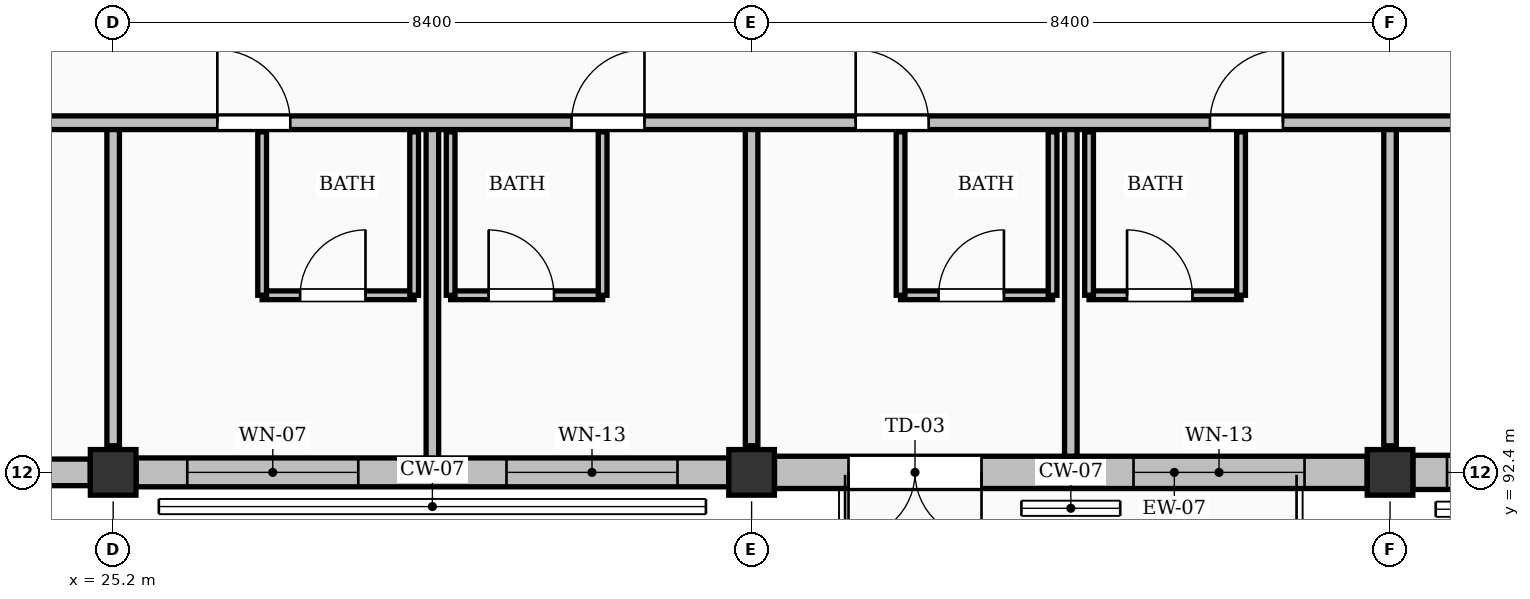
"""IFC4 building model, lengths in metres.
Left out: names, types, materials, properties, quantities, classifications, styles, units other than length and angle.
Written with IfcOpenShell. Run it as: python <this file> out.ifc"""

import sys

from ifc_helpers import new_model, si_unit, direction, frame, frame_2d, origin, origin_2d, place, context, subcontext, project, spatial, rectangle, extrude, element, fill, save


model = new_model("IFC4")
c1 = context("Model", 3, precision=1e-05, world=origin(), true_north=direction((0.0, 1.0)))
c2 = subcontext(c1, "Body", "Model", "MODEL_VIEW")
j1 = project(units=[si_unit("LENGTHUNIT", "METRE"), si_unit("PLANEANGLEUNIT", "RADIAN")], contexts=[c1])
p1 = place(None, origin())
s1 = spatial("IfcSite", under=j1, at=p1, CompositionType="ELEMENT")
p2 = place(p1, origin())
s2 = spatial("IfcBuilding", under=s1, at=p2, CompositionType="ELEMENT")
p3 = place(p2, frame((0.0, 0.0, 31.92)))
s3 = spatial("IfcBuildingStorey", under=s2, at=p3, CompositionType="ELEMENT", Elevation=31.92)
for number, where, z_axis, x_axis in (
    (1, (25.2, 92.4, 0.0), (0.0, 0.0, 1.0), (1.0, 0.0, 0.0)),
    (2, (33.6, 92.4, 0.0), (0.0, 0.0, 1.0), (1.0, 0.0, 0.0)),
    (3, (42.0, 92.4, 0.0), (0.0, 0.0, 1.0), (1.0, 0.0, 0.0)),
):
    element("IfcColumn", number, at=place(p3, frame(where, z_axis=z_axis, x_axis=x_axis)), inside=s3, PredefinedType="COLUMN", context=c2, shape_type="SweptSolid", body=[
        extrude(rectangle(XDim=0.6, YDim=0.6, at=origin_2d()), origin(), (0.0, 0.0, 1.0), 3.36),
    ])
p4 = place(p3, frame((17.101, 92.4, 0.0), z_axis=(0.0, 0.0, 1.0), x_axis=(1.0, 0.0, 0.0)))
e4 = element("IfcWall", 4, at=p4, inside=s3, PredefinedType="SOLIDWALL", context=c2, shape_type="SweptSolid", body=[
    extrude(rectangle(XDim=7.798, YDim=0.35, at=frame_2d((3.899, 0.0))), origin(), (0.0, 0.0, 1.0), 2.474),
])
p5 = place(p4, frame((1.024, 0.0, 0.0)))
e5 = element("IfcOpeningElement", 5, at=p5, cuts=e4, PredefinedType="OPENING", context=c2, shape_type="SweptSolid", body=[
    extrude(rectangle(XDim=1.65, YDim=2.08, at=frame_2d((0.825, 1.04))), frame((0.0, 0.185, 0.0), z_axis=(0.0, -1.0, 0.0), x_axis=(1.0, 0.0, 0.0)), (0.0, 0.0, 1.0), 0.37),
])
p6 = place(p4, frame((4.674, 0.0, 0.25)))
e6 = element("IfcOpeningElement", 6, at=p6, cuts=e4, PredefinedType="OPENING", context=c2, shape_type="SweptSolid", body=[
    extrude(rectangle(XDim=2.35, YDim=1.85, at=frame_2d((1.175, 0.925))), frame((0.0, 0.185, 0.0), z_axis=(0.0, -1.0, 0.0), x_axis=(1.0, 0.0, 0.0)), (0.0, 0.0, 1.0), 0.37),
])
p7 = place(p3, frame((25.501, 92.4, 0.0), z_axis=(0.0, 0.0, 1.0), x_axis=(1.0, 0.0, 0.0)))
e7 = element("IfcWall", 7, at=p7, inside=s3, PredefinedType="SOLIDWALL", context=c2, shape_type="SweptSolid", body=[
    extrude(rectangle(XDim=7.798, YDim=0.38, at=frame_2d((3.899, 0.0))), origin(), (0.0, 0.0, 1.0), 2.474),
])
p8 = place(p7, frame((0.674, 0.0, 0.25)))
e8 = element("IfcOpeningElement", 8, at=p8, cuts=e7, PredefinedType="OPENING", context=c2, shape_type="SweptSolid", body=[
    extrude(rectangle(XDim=2.25, YDim=1.95, at=frame_2d((1.125, 0.975))), frame((0.0, 0.2, 0.0), z_axis=(0.0, -1.0, 0.0), x_axis=(1.0, 0.0, 0.0)), (0.0, 0.0, 1.0), 0.4),
])
p9 = place(p7, frame((4.874, 0.0, 0.25)))
e9 = element("IfcOpeningElement", 9, at=p9, cuts=e7, PredefinedType="OPENING", context=c2, shape_type="SweptSolid", body=[
    extrude(rectangle(XDim=2.25, YDim=2.05, at=frame_2d((1.125, 1.025))), frame((0.0, 0.2, 0.0), z_axis=(0.0, -1.0, 0.0), x_axis=(1.0, 0.0, 0.0)), (0.0, 0.0, 1.0), 0.4),
])
p10 = place(p3, frame((33.901, 92.4, 0.0), z_axis=(0.0, 0.0, 1.0), x_axis=(1.0, 0.0, 0.0)))
e10 = element("IfcWall", 10, at=p10, inside=s3, PredefinedType="SOLIDWALL", context=c2, shape_type="SweptSolid", body=[
    extrude(rectangle(XDim=7.798, YDim=0.425, at=frame_2d((3.899, 0.0))), origin(), (0.0, 0.0, 1.0), 2.474),
])
p11 = place(p10, frame((0.974, 0.0, 0.0)))
e11 = element("IfcOpeningElement", 11, at=p11, cuts=e10, PredefinedType="OPENING", context=c2, shape_type="SweptSolid", body=[
    extrude(rectangle(XDim=1.75, YDim=2.08, at=frame_2d((0.875, 1.04))), frame((0.0, 0.223, 0.0), z_axis=(0.0, -1.0, 0.0), x_axis=(1.0, 0.0, 0.0)), (0.0, 0.0, 1.0), 0.445),
])
p12 = place(p10, frame((4.724, 0.0, 0.25)))
e12 = element("IfcOpeningElement", 12, at=p12, cuts=e10, PredefinedType="OPENING", context=c2, shape_type="SweptSolid", body=[
    extrude(rectangle(XDim=2.25, YDim=2.05, at=frame_2d((1.125, 1.025))), frame((0.0, 0.223, 0.0), z_axis=(0.0, -1.0, 0.0), x_axis=(1.0, 0.0, 0.0)), (0.0, 0.0, 1.0), 0.445),
])
p13 = place(p3, frame((42.301, 92.4, 0.0), z_axis=(0.0, 0.0, 1.0), x_axis=(1.0, 0.0, 0.0)))
e13 = element("IfcWall", 13, at=p13, inside=s3, PredefinedType="SOLIDWALL", context=c2, shape_type="SweptSolid", body=[
    extrude(rectangle(XDim=7.798, YDim=0.45, at=frame_2d((3.899, 0.0))), origin(), (0.0, 0.0, 1.0), 2.474),
])
p14 = place(p13, frame((0.449, 0.0, 0.25)))
e14 = element("IfcOpeningElement", 14, at=p14, cuts=e13, PredefinedType="OPENING", context=c2, shape_type="SweptSolid", body=[
    extrude(rectangle(XDim=2.7, YDim=1.75, at=frame_2d((1.35, 0.875))), frame((0.0, 0.235, 0.0), z_axis=(0.0, -1.0, 0.0), x_axis=(1.0, 0.0, 0.0)), (0.0, 0.0, 1.0), 0.47),
])
p15 = place(p13, frame((4.689, 0.0, 0.25)))
e15 = element("IfcOpeningElement", 15, at=p15, cuts=e13, PredefinedType="OPENING", context=c2, shape_type="SweptSolid", body=[
    extrude(rectangle(XDim=2.62, YDim=1.9, at=frame_2d((1.31, 0.95))), frame((0.0, 0.235, 0.0), z_axis=(0.0, -1.0, 0.0), x_axis=(1.0, 0.0, 0.0)), (0.0, 0.0, 1.0), 0.47),
])
p16 = place(p3, frame((27.16, 94.73, 0.0), z_axis=(0.0, 0.0, 1.0), x_axis=(1.0, 0.0, 0.0)))
e16 = element("IfcWall", 16, at=p16, inside=s3, PredefinedType="PARTITIONING", context=c2, shape_type="SweptSolid", body=[
    extrude(rectangle(XDim=2.0, YDim=0.115, at=frame_2d((1.0, 0.0))), origin(), (0.0, 0.0, 1.0), 3.1),
])
p17 = place(p16, frame((0.5, 0.0, 0.0)))
e17 = element("IfcOpeningElement", 17, at=p17, cuts=e16, PredefinedType="OPENING", context=c2, shape_type="SweptSolid", body=[
    extrude(rectangle(XDim=0.86, YDim=2.05, at=frame_2d((0.43, 1.025))), frame((0.0, 0.067, 0.0), z_axis=(0.0, -1.0, 0.0), x_axis=(1.0, 0.0, 0.0)), (0.0, 0.0, 1.0), 0.135),
])
p18 = place(p3, frame((27.16, 94.73, 0.0), z_axis=(0.0, 0.0, 1.0), x_axis=(0.0, 1.0, 0.0)))
e18 = element("IfcWall", 18, at=p18, inside=s3, PredefinedType="PARTITIONING", context=c2, shape_type="SweptSolid", body=[
    extrude(rectangle(XDim=2.15, YDim=0.115, at=frame_2d((1.075, 0.0))), origin(), (0.0, 0.0, 1.0), 2.622),
])
p19 = place(p3, frame((29.16, 94.73, 0.0), z_axis=(0.0, 0.0, 1.0), x_axis=(0.0, 1.0, 0.0)))
e19 = element("IfcWall", 19, at=p19, inside=s3, PredefinedType="PARTITIONING", context=c2, shape_type="SweptSolid", body=[
    extrude(rectangle(XDim=2.15, YDim=0.115, at=frame_2d((1.075, 0.0))), origin(), (0.0, 0.0, 1.0), 3.1),
])
p20 = place(p3, frame((29.64, 94.73, 0.0), z_axis=(0.0, 0.0, 1.0), x_axis=(1.0, 0.0, 0.0)))
e20 = element("IfcWall", 20, at=p20, inside=s3, PredefinedType="PARTITIONING", context=c2, shape_type="SweptSolid", body=[
    extrude(rectangle(XDim=2.0, YDim=0.115, at=frame_2d((1.0, 0.0))), origin(), (0.0, 0.0, 1.0), 3.1),
])
p21 = place(p20, frame((0.5, 0.0, 0.0)))
e21 = element("IfcOpeningElement", 21, at=p21, cuts=e20, PredefinedType="OPENING", context=c2, shape_type="SweptSolid", body=[
    extrude(rectangle(XDim=0.86, YDim=2.05, at=frame_2d((0.43, 1.025))), frame((0.0, 0.067, 0.0), z_axis=(0.0, -1.0, 0.0), x_axis=(1.0, 0.0, 0.0)), (0.0, 0.0, 1.0), 0.135),
])
p22 = place(p3, frame((29.64, 94.73, 0.0), z_axis=(0.0, 0.0, 1.0), x_axis=(0.0, 1.0, 0.0)))
e22 = element("IfcWall", 22, at=p22, inside=s3, PredefinedType="PARTITIONING", context=c2, shape_type="SweptSolid", body=[
    extrude(rectangle(XDim=2.15, YDim=0.115, at=frame_2d((1.075, 0.0))), origin(), (0.0, 0.0, 1.0), 3.1),
])
p23 = place(p3, frame((31.64, 94.73, 0.0), z_axis=(0.0, 0.0, 1.0), x_axis=(0.0, 1.0, 0.0)))
e23 = element("IfcWall", 23, at=p23, inside=s3, PredefinedType="PARTITIONING", context=c2, shape_type="SweptSolid", body=[
    extrude(rectangle(XDim=2.15, YDim=0.115, at=frame_2d((1.075, 0.0))), origin(), (0.0, 0.0, 1.0), 2.622),
])
p24 = place(p3, frame((29.4, 92.59, 0.0), z_axis=(0.0, 0.0, 1.0), x_axis=(0.0, 1.0, 0.0)))
e24 = element("IfcWall", 24, at=p24, inside=s3, PredefinedType="PARTITIONING", context=c2, shape_type="SweptSolid", body=[
    extrude(rectangle(XDim=4.41, YDim=0.165, at=frame_2d((2.205, 0.0))), origin(), (0.0, 0.0, 1.0), 3.1),
])
p25 = place(p3, frame((25.2, 92.75, 0.0), z_axis=(0.0, 0.0, 1.0), x_axis=(0.0, 1.0, 0.0)))
e25 = element("IfcWall", 25, at=p25, inside=s3, PredefinedType="PARTITIONING", context=c2, shape_type="SweptSolid", body=[
    extrude(rectangle(XDim=4.25, YDim=0.165, at=frame_2d((2.125, 0.0))), origin(), (0.0, 0.0, 1.0), 2.435),
])
p26 = place(p3, frame((35.56, 94.73, 0.0), z_axis=(0.0, 0.0, 1.0), x_axis=(1.0, 0.0, 0.0)))
e26 = element("IfcWall", 26, at=p26, inside=s3, PredefinedType="PARTITIONING", context=c2, shape_type="SweptSolid", body=[
    extrude(rectangle(XDim=2.0, YDim=0.115, at=frame_2d((1.0, 0.0))), origin(), (0.0, 0.0, 1.0), 3.1),
])
p27 = place(p26, frame((0.5, 0.0, 0.0)))
e27 = element("IfcOpeningElement", 27, at=p27, cuts=e26, PredefinedType="OPENING", context=c2, shape_type="SweptSolid", body=[
    extrude(rectangle(XDim=0.86, YDim=2.05, at=frame_2d((0.43, 1.025))), frame((0.0, 0.067, 0.0), z_axis=(0.0, -1.0, 0.0), x_axis=(1.0, 0.0, 0.0)), (0.0, 0.0, 1.0), 0.135),
])
for number, where, z_axis, x_axis in (
    (28, (35.56, 94.73, 0.0), (0.0, 0.0, 1.0), (0.0, 1.0, 0.0)),
    (29, (37.56, 94.73, 0.0), (0.0, 0.0, 1.0), (0.0, 1.0, 0.0)),
):
    element("IfcWall", number, at=place(p3, frame(where, z_axis=z_axis, x_axis=x_axis)), inside=s3, PredefinedType="PARTITIONING", context=c2, shape_type="SweptSolid", body=[
        extrude(rectangle(XDim=2.15, YDim=0.115, at=frame_2d((1.075, 0.0))), origin(), (0.0, 0.0, 1.0), 3.1),
    ])
p28 = place(p3, frame((38.04, 94.73, 0.0), z_axis=(0.0, 0.0, 1.0), x_axis=(1.0, 0.0, 0.0)))
e30 = element("IfcWall", 30, at=p28, inside=s3, PredefinedType="PARTITIONING", context=c2, shape_type="SweptSolid", body=[
    extrude(rectangle(XDim=2.0, YDim=0.115, at=frame_2d((1.0, 0.0))), origin(), (0.0, 0.0, 1.0), 3.1),
])
p29 = place(p28, frame((0.5, 0.0, 0.0)))
e31 = element("IfcOpeningElement", 31, at=p29, cuts=e30, PredefinedType="OPENING", context=c2, shape_type="SweptSolid", body=[
    extrude(rectangle(XDim=0.86, YDim=2.05, at=frame_2d((0.43, 1.025))), frame((0.0, 0.067, 0.0), z_axis=(0.0, -1.0, 0.0), x_axis=(1.0, 0.0, 0.0)), (0.0, 0.0, 1.0), 0.135),
])
for number, where, z_axis, x_axis in (
    (32, (38.04, 94.73, 0.0), (0.0, 0.0, 1.0), (0.0, 1.0, 0.0)),
    (33, (40.04, 94.73, 0.0), (0.0, 0.0, 1.0), (0.0, 1.0, 0.0)),
):
    element("IfcWall", number, at=place(p3, frame(where, z_axis=z_axis, x_axis=x_axis)), inside=s3, PredefinedType="PARTITIONING", context=c2, shape_type="SweptSolid", body=[
        extrude(rectangle(XDim=2.15, YDim=0.115, at=frame_2d((1.075, 0.0))), origin(), (0.0, 0.0, 1.0), 3.1),
    ])
p30 = place(p3, frame((37.8, 92.613, 0.0), z_axis=(0.0, 0.0, 1.0), x_axis=(0.0, 1.0, 0.0)))
e34 = element("IfcWall", 34, at=p30, inside=s3, PredefinedType="PARTITIONING", context=c2, shape_type="SweptSolid", body=[
    extrude(rectangle(XDim=4.387, YDim=0.165, at=frame_2d((2.194, 0.0))), origin(), (0.0, 0.0, 1.0), 3.1),
])
for number, where, z_axis, x_axis in (
    (35, (33.6, 92.75, 0.0), (0.0, 0.0, 1.0), (0.0, 1.0, 0.0)),
    (36, (42.0, 92.75, 0.0), (0.0, 0.0, 1.0), (0.0, 1.0, 0.0)),
):
    element("IfcWall", number, at=place(p3, frame(where, z_axis=z_axis, x_axis=x_axis)), inside=s3, PredefinedType="PARTITIONING", context=c2, shape_type="SweptSolid", body=[
        extrude(rectangle(XDim=4.25, YDim=0.165, at=frame_2d((2.125, 0.0))), origin(), (0.0, 0.0, 1.0), 2.435),
    ])
p31 = place(p3, frame((8.562, 97.0, 0.0), z_axis=(0.0, 0.0, 1.0), x_axis=(1.0, 0.0, 0.0)))
e37 = element("IfcWall", 37, at=p31, inside=s3, PredefinedType="PARTITIONING", context=c2, shape_type="SweptSolid", body=[
    extrude(rectangle(XDim=41.837, YDim=0.18, at=frame_2d((20.919, 0.0))), origin(), (0.0, 0.0, 1.0), 3.1),
])
p32 = place(p31, frame((1.207, 0.0, 0.0)))
e38 = element("IfcOpeningElement", 38, at=p32, cuts=e37, PredefinedType="OPENING", context=c2, shape_type="SweptSolid", body=[
    extrude(rectangle(XDim=0.96, YDim=2.15, at=frame_2d((0.48, 1.075))), frame((0.0, 0.1, 0.0), z_axis=(0.0, -1.0, 0.0), x_axis=(1.0, 0.0, 0.0)), (0.0, 0.0, 1.0), 0.2),
])
p33 = place(p31, frame((5.867, 0.0, 0.0)))
e39 = element("IfcOpeningElement", 39, at=p33, cuts=e37, PredefinedType="OPENING", context=c2, shape_type="SweptSolid", body=[
    extrude(rectangle(XDim=0.96, YDim=2.15, at=frame_2d((0.48, 1.075))), frame((0.0, 0.1, 0.0), z_axis=(0.0, -1.0, 0.0), x_axis=(1.0, 0.0, 0.0)), (0.0, 0.0, 1.0), 0.2),
])
p34 = place(p31, frame((9.608, 0.0, 0.0)))
e40 = element("IfcOpeningElement", 40, at=p34, cuts=e37, PredefinedType="OPENING", context=c2, shape_type="SweptSolid", body=[
    extrude(rectangle(XDim=0.96, YDim=2.15, at=frame_2d((0.48, 1.075))), frame((0.0, 0.1, 0.0), z_axis=(0.0, -1.0, 0.0), x_axis=(1.0, 0.0, 0.0)), (0.0, 0.0, 1.0), 0.2),
])
p35 = place(p31, frame((14.267, 0.0, 0.0)))
e41 = element("IfcOpeningElement", 41, at=p35, cuts=e37, PredefinedType="OPENING", context=c2, shape_type="SweptSolid", body=[
    extrude(rectangle(XDim=0.96, YDim=2.15, at=frame_2d((0.48, 1.075))), frame((0.0, 0.1, 0.0), z_axis=(0.0, -1.0, 0.0), x_axis=(1.0, 0.0, 0.0)), (0.0, 0.0, 1.0), 0.2),
])
p36 = place(p31, frame((18.008, 0.0, 0.0)))
e42 = element("IfcOpeningElement", 42, at=p36, cuts=e37, PredefinedType="OPENING", context=c2, shape_type="SweptSolid", body=[
    extrude(rectangle(XDim=0.96, YDim=2.15, at=frame_2d((0.48, 1.075))), frame((0.0, 0.1, 0.0), z_axis=(0.0, -1.0, 0.0), x_axis=(1.0, 0.0, 0.0)), (0.0, 0.0, 1.0), 0.2),
])
p37 = place(p31, frame((22.668, 0.0, 0.0)))
e43 = element("IfcOpeningElement", 43, at=p37, cuts=e37, PredefinedType="OPENING", context=c2, shape_type="SweptSolid", body=[
    extrude(rectangle(XDim=0.96, YDim=2.15, at=frame_2d((0.48, 1.075))), frame((0.0, 0.1, 0.0), z_axis=(0.0, -1.0, 0.0), x_axis=(1.0, 0.0, 0.0)), (0.0, 0.0, 1.0), 0.2),
])
p38 = place(p31, frame((26.407, 0.0, 0.0)))
e44 = element("IfcOpeningElement", 44, at=p38, cuts=e37, PredefinedType="OPENING", context=c2, shape_type="SweptSolid", body=[
    extrude(rectangle(XDim=0.96, YDim=2.15, at=frame_2d((0.48, 1.075))), frame((0.0, 0.1, 0.0), z_axis=(0.0, -1.0, 0.0), x_axis=(1.0, 0.0, 0.0)), (0.0, 0.0, 1.0), 0.2),
])
p39 = place(p31, frame((31.068, 0.0, 0.0)))
e45 = element("IfcOpeningElement", 45, at=p39, cuts=e37, PredefinedType="OPENING", context=c2, shape_type="SweptSolid", body=[
    extrude(rectangle(XDim=0.96, YDim=2.15, at=frame_2d((0.48, 1.075))), frame((0.0, 0.1, 0.0), z_axis=(0.0, -1.0, 0.0), x_axis=(1.0, 0.0, 0.0)), (0.0, 0.0, 1.0), 0.2),
])
p40 = place(p31, frame((36.837, 0.0, 0.0)))
e46 = element("IfcOpeningElement", 46, at=p40, cuts=e37, PredefinedType="OPENING", context=c2, shape_type="SweptSolid", body=[
    extrude(rectangle(XDim=1.62, YDim=2.2, at=frame_2d((0.81, 1.1))), frame((0.0, 0.1, 0.0), z_axis=(0.0, -1.0, 0.0), x_axis=(1.0, 0.0, 0.0)), (0.0, 0.0, 1.0), 0.2),
])
p41 = place(p8, origin())
e47 = element("IfcWindow", 47, at=p41, inside=s3, PartitioningType="DOUBLE_PANEL_VERTICAL", PredefinedType="WINDOW", context=c2, shape_type="SweptSolid", body=[
    extrude(rectangle(XDim=2.25, YDim=1.95, at=frame_2d((1.125, 0.975))), frame((0.0, 0.03, 0.0), z_axis=(0.0, -1.0, 0.0), x_axis=(1.0, 0.0, 0.0)), (0.0, 0.0, 1.0), 0.06),
])
fill(e8, e47)
p42 = place(p9, origin())
e48 = element("IfcWindow", 48, at=p42, inside=s3, PartitioningType="DOUBLE_PANEL_VERTICAL", PredefinedType="WINDOW", context=c2, shape_type="SweptSolid", body=[
    extrude(rectangle(XDim=2.25, YDim=2.05, at=frame_2d((1.125, 1.025))), frame((0.0, 0.03, 0.0), z_axis=(0.0, -1.0, 0.0), x_axis=(1.0, 0.0, 0.0)), (0.0, 0.0, 1.0), 0.06),
])
fill(e9, e48)
p43 = place(p11, frame((1.75, 0.0, 0.0), z_axis=(0.0, 0.0, 1.0), x_axis=(-1.0, 0.0, 0.0)))
e49 = element("IfcDoor", 49, at=p43, inside=s3, OperationType="DOUBLE_DOOR_SINGLE_SWING", PredefinedType="DOOR", context=c2, shape_type="SweptSolid", body=[
    extrude(rectangle(XDim=1.75, YDim=2.08, at=frame_2d((0.875, 1.04))), frame((0.0, 0.025, 0.0), z_axis=(0.0, -1.0, 0.0), x_axis=(1.0, 0.0, 0.0)), (0.0, 0.0, 1.0), 0.05),
])
fill(e11, e49)
p44 = place(p12, origin())
e50 = element("IfcWindow", 50, at=p44, inside=s3, PartitioningType="DOUBLE_PANEL_VERTICAL", PredefinedType="WINDOW", context=c2, shape_type="SweptSolid", body=[
    extrude(rectangle(XDim=2.25, YDim=2.05, at=frame_2d((1.125, 1.025))), frame((0.0, 0.03, 0.0), z_axis=(0.0, -1.0, 0.0), x_axis=(1.0, 0.0, 0.0)), (0.0, 0.0, 1.0), 0.06),
])
fill(e12, e50)
p45 = place(p14, origin())
e51 = element("IfcWindow", 51, at=p45, inside=s3, PartitioningType="DOUBLE_PANEL_VERTICAL", PredefinedType="WINDOW", context=c2, shape_type="SweptSolid", body=[
    extrude(rectangle(XDim=2.7, YDim=1.75, at=frame_2d((1.35, 0.875))), frame((0.0, 0.03, 0.0), z_axis=(0.0, -1.0, 0.0), x_axis=(1.0, 0.0, 0.0)), (0.0, 0.0, 1.0), 0.06),
])
fill(e14, e51)
p46 = place(p17, origin())
e52 = element("IfcDoor", 52, at=p46, inside=s3, OperationType="SINGLE_SWING_RIGHT", PredefinedType="DOOR", context=c2, shape_type="SweptSolid", body=[
    extrude(rectangle(XDim=0.86, YDim=2.05, at=frame_2d((0.43, 1.025))), frame((0.0, 0.025, 0.0), z_axis=(0.0, -1.0, 0.0), x_axis=(1.0, 0.0, 0.0)), (0.0, 0.0, 1.0), 0.05),
])
fill(e17, e52)
p47 = place(p21, origin())
e53 = element("IfcDoor", 53, at=p47, inside=s3, OperationType="SINGLE_SWING_LEFT", PredefinedType="DOOR", context=c2, shape_type="SweptSolid", body=[
    extrude(rectangle(XDim=0.86, YDim=2.05, at=frame_2d((0.43, 1.025))), frame((0.0, 0.025, 0.0), z_axis=(0.0, -1.0, 0.0), x_axis=(1.0, 0.0, 0.0)), (0.0, 0.0, 1.0), 0.05),
])
fill(e21, e53)
p48 = place(p27, origin())
e54 = element("IfcDoor", 54, at=p48, inside=s3, OperationType="SINGLE_SWING_RIGHT", PredefinedType="DOOR", context=c2, shape_type="SweptSolid", body=[
    extrude(rectangle(XDim=0.86, YDim=2.05, at=frame_2d((0.43, 1.025))), frame((0.0, 0.025, 0.0), z_axis=(0.0, -1.0, 0.0), x_axis=(1.0, 0.0, 0.0)), (0.0, 0.0, 1.0), 0.05),
])
fill(e27, e54)
p49 = place(p29, origin())
e55 = element("IfcDoor", 55, at=p49, inside=s3, OperationType="SINGLE_SWING_LEFT", PredefinedType="DOOR", context=c2, shape_type="SweptSolid", body=[
    extrude(rectangle(XDim=0.86, YDim=2.05, at=frame_2d((0.43, 1.025))), frame((0.0, 0.025, 0.0), z_axis=(0.0, -1.0, 0.0), x_axis=(1.0, 0.0, 0.0)), (0.0, 0.0, 1.0), 0.05),
])
fill(e31, e55)
p50 = place(p36, origin())
e56 = element("IfcDoor", 56, at=p50, inside=s3, OperationType="SINGLE_SWING_LEFT", PredefinedType="DOOR", context=c2, shape_type="SweptSolid", body=[
    extrude(rectangle(XDim=0.96, YDim=2.15, at=frame_2d((0.48, 1.075))), frame((0.0, 0.025, 0.0), z_axis=(0.0, -1.0, 0.0), x_axis=(1.0, 0.0, 0.0)), (0.0, 0.0, 1.0), 0.05),
])
fill(e42, e56)
p51 = place(p37, origin())
e57 = element("IfcDoor", 57, at=p51, inside=s3, OperationType="SINGLE_SWING_RIGHT", PredefinedType="DOOR", context=c2, shape_type="SweptSolid", body=[
    extrude(rectangle(XDim=0.96, YDim=2.15, at=frame_2d((0.48, 1.075))), frame((0.0, 0.025, 0.0), z_axis=(0.0, -1.0, 0.0), x_axis=(1.0, 0.0, 0.0)), (0.0, 0.0, 1.0), 0.05),
])
fill(e43, e57)
p52 = place(p38, origin())
e58 = element("IfcDoor", 58, at=p52, inside=s3, OperationType="SINGLE_SWING_LEFT", PredefinedType="DOOR", context=c2, shape_type="SweptSolid", body=[
    extrude(rectangle(XDim=0.96, YDim=2.15, at=frame_2d((0.48, 1.075))), frame((0.0, 0.025, 0.0), z_axis=(0.0, -1.0, 0.0), x_axis=(1.0, 0.0, 0.0)), (0.0, 0.0, 1.0), 0.05),
])
fill(e44, e58)
p53 = place(p39, origin())
e59 = element("IfcDoor", 59, at=p53, inside=s3, OperationType="SINGLE_SWING_RIGHT", PredefinedType="DOOR", context=c2, shape_type="SweptSolid", body=[
    extrude(rectangle(XDim=0.96, YDim=2.15, at=frame_2d((0.48, 1.075))), frame((0.0, 0.025, 0.0), z_axis=(0.0, -1.0, 0.0), x_axis=(1.0, 0.0, 0.0)), (0.0, 0.0, 1.0), 0.05),
])
fill(e45, e59)
save(model, sys.argv[1])
